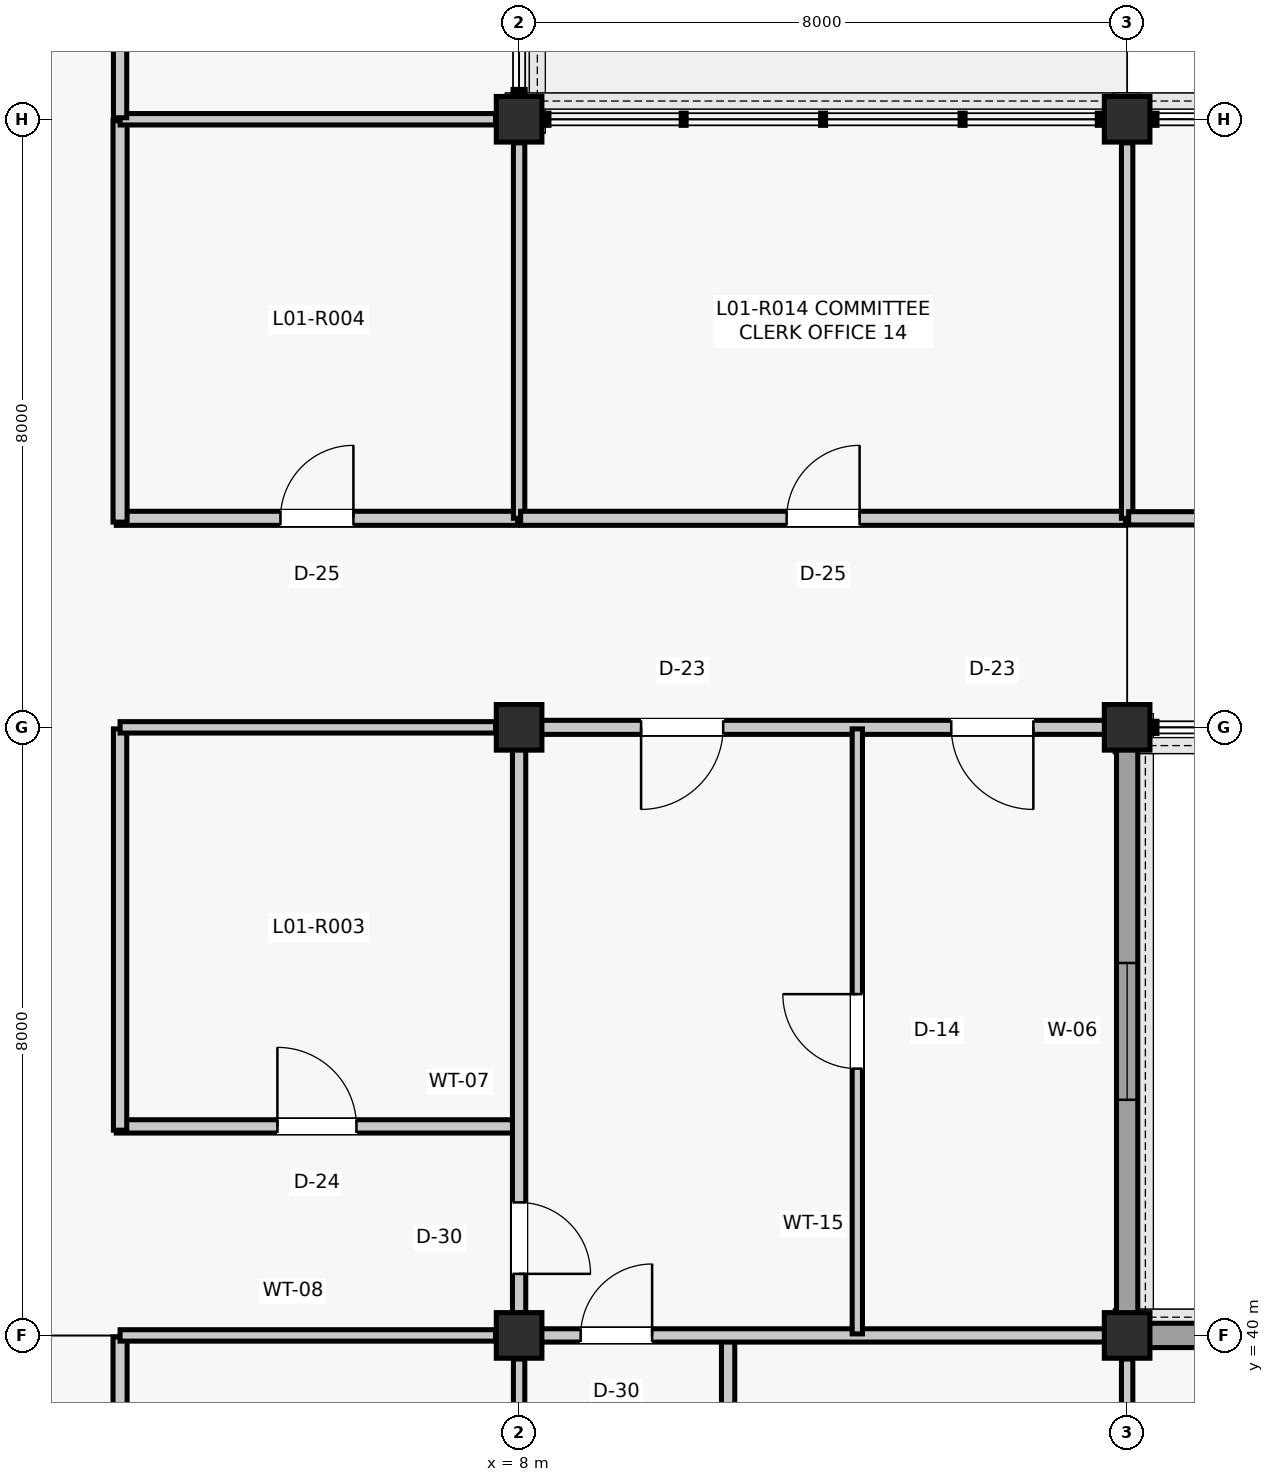
"""IFC4 building model, lengths in metres.
Left out: names, types, materials, properties, quantities, classifications, styles, units other than length and angle.
Written with IfcOpenShell. Run it as: python <this file> out.ifc"""

import sys

from ifc_helpers import new_model, si_unit, direction, frame, frame_2d, origin, origin_2d, place, context, subcontext, project, spatial, rectangle, extrude, element, fill, save


model = new_model("IFC4")
c1 = context("Model", 3, precision=1e-05, world=origin(), true_north=direction((0.0, 1.0)))
c2 = subcontext(c1, "Body", "Model", "MODEL_VIEW")
j1 = project(units=[si_unit("LENGTHUNIT", "METRE"), si_unit("PLANEANGLEUNIT", "RADIAN")], contexts=[c1])
p1 = place(None, origin())
s1 = spatial("IfcSite", under=j1, at=p1, CompositionType="ELEMENT")
p2 = place(p1, origin())
s2 = spatial("IfcBuilding", under=s1, at=p2, CompositionType="ELEMENT")
p3 = place(p2, frame((0.0, 0.0, 5.28)))
s3 = spatial("IfcBuildingStorey", under=s2, at=p3, CompositionType="ELEMENT", Elevation=5.28)
for number, where, z_axis, x_axis in (
    (1, (8.0, 40.0, 0.0), (0.0, 0.0, 1.0), (1.0, 0.0, 0.0)),
    (2, (8.0, 48.0, 0.0), (0.0, 0.0, 1.0), (1.0, 0.0, 0.0)),
    (3, (8.0, 56.0, 0.0), (0.0, 0.0, 1.0), (1.0, 0.0, 0.0)),
    (4, (16.0, 40.0, 0.0), (0.0, 0.0, 1.0), (1.0, 0.0, 0.0)),
    (5, (16.0, 48.0, 0.0), (0.0, 0.0, 1.0), (1.0, 0.0, 0.0)),
    (6, (16.0, 56.0, 0.0), (0.0, 0.0, 1.0), (1.0, 0.0, 0.0)),
):
    element("IfcColumn", number, at=place(p3, frame(where, z_axis=z_axis, x_axis=x_axis)), inside=s3, PredefinedType="COLUMN", context=c2, shape_type="SweptSolid", body=[
        extrude(rectangle(XDim=0.6, YDim=0.6, at=origin_2d()), origin(), (0.0, 0.0, 1.0), 4.62),
    ])
p4 = place(p3, frame((16.0, 40.285, 0.0), z_axis=(0.0, 0.0, 1.0), x_axis=(0.0, 1.0, 0.0)))
e7 = element("IfcWall", 7, at=p4, inside=s3, PredefinedType="SOLIDWALL", context=c2, shape_type="SweptSolid", body=[
    extrude(rectangle(XDim=7.43, YDim=0.28, at=frame_2d((3.715, 0.0))), origin(), (0.0, 0.0, 1.0), 3.91),
])
p5 = place(p4, frame((2.815, 0.0, 0.9)))
e8 = element("IfcOpeningElement", 8, at=p5, cuts=e7, PredefinedType="OPENING", context=c2, shape_type="SweptSolid", body=[
    extrude(rectangle(XDim=1.8, YDim=2.3, at=frame_2d((0.9, 1.15))), frame((0.0, 0.15, 0.0), z_axis=(0.0, -1.0, 0.0), x_axis=(1.0, 0.0, 0.0)), (0.0, 0.0, 1.0), 0.3),
])
p6 = place(p3, frame((16.285, 40.0, 0.0), z_axis=(0.0, 0.0, 1.0), x_axis=(1.0, 0.0, 0.0)))
e9 = element("IfcWall", 9, at=p6, inside=s3, PredefinedType="SOLIDWALL", context=c2, shape_type="SweptSolid", body=[
    extrude(rectangle(XDim=7.43, YDim=0.32, at=frame_2d((3.715, 0.0))), origin(), (0.0, 0.0, 1.0), 3.955),
])
p7 = place(p6, frame((2.815, 0.0, 0.9)))
e10 = element("IfcOpeningElement", 10, at=p7, cuts=e9, PredefinedType="OPENING", context=c2, shape_type="SweptSolid", body=[
    extrude(rectangle(XDim=1.8, YDim=2.3, at=frame_2d((0.9, 1.15))), frame((0.0, 0.17, 0.0), z_axis=(0.0, -1.0, 0.0), x_axis=(1.0, 0.0, 0.0)), (0.0, 0.0, 1.0), 0.34),
])
p8 = place(p3, frame((2.75, 34.7, 0.0), z_axis=(0.0, 0.0, 1.0), x_axis=(0.0, 1.0, 0.0)))
e11 = element("IfcWall", 11, at=p8, inside=s3, PredefinedType="PARTITIONING", context=c2, shape_type="SweptSolid", body=[
    extrude(rectangle(XDim=5.28, YDim=0.185, at=frame_2d((2.64, 0.0))), origin(), (0.0, 0.0, 1.0), 3.787),
])
p9 = place(p3, frame((2.75, 40.0, 0.0), z_axis=(0.0, 0.0, 1.0), x_axis=(1.0, 0.0, 0.0)))
e12 = element("IfcWall", 12, at=p9, inside=s3, PredefinedType="PARTITIONING", context=c2, shape_type="SweptSolid", body=[
    extrude(rectangle(XDim=4.94, YDim=0.15, at=frame_2d((2.47, 0.0))), origin(), (0.0, 0.0, 1.0), 3.787),
])
p10 = place(p3, frame((8.0, 34.75, 0.0), z_axis=(0.0, 0.0, 1.0), x_axis=(0.0, 1.0, 0.0)))
e13 = element("IfcWall", 13, at=p10, inside=s3, PredefinedType="PARTITIONING", context=c2, shape_type="SweptSolid", body=[
    extrude(rectangle(XDim=4.94, YDim=0.15, at=frame_2d((2.47, 0.0))), origin(), (0.0, 0.0, 1.0), 3.857),
])
p11 = place(p3, frame((2.7, 42.75, 0.0), z_axis=(0.0, 0.0, 1.0), x_axis=(1.0, 0.0, 0.0)))
e14 = element("IfcWall", 14, at=p11, inside=s3, PredefinedType="PARTITIONING", context=c2, shape_type="SweptSolid", body=[
    extrude(rectangle(XDim=5.28, YDim=0.175, at=frame_2d((2.64, 0.0))), origin(), (0.0, 0.0, 1.0), 3.781),
])
p12 = place(p11, frame((2.12, 0.0, 0.0)))
e15 = element("IfcOpeningElement", 15, at=p12, cuts=e14, PredefinedType="OPENING", context=c2, shape_type="SweptSolid", body=[
    extrude(rectangle(XDim=1.04, YDim=2.18, at=frame_2d((0.52, 1.09))), frame((0.0, 0.097, 0.0), z_axis=(0.0, -1.0, 0.0), x_axis=(1.0, 0.0, 0.0)), (0.0, 0.0, 1.0), 0.195),
])
p13 = place(p3, frame((2.75, 42.7, 0.0), z_axis=(0.0, 0.0, 1.0), x_axis=(0.0, 1.0, 0.0)))
e16 = element("IfcWall", 16, at=p13, inside=s3, PredefinedType="PARTITIONING", context=c2, shape_type="SweptSolid", body=[
    extrude(rectangle(XDim=5.28, YDim=0.175, at=frame_2d((2.64, 0.0))), origin(), (0.0, 0.0, 1.0), 3.771),
])
p14 = place(p3, frame((2.75, 48.0, 0.0), z_axis=(0.0, 0.0, 1.0), x_axis=(1.0, 0.0, 0.0)))
e17 = element("IfcWall", 17, at=p14, inside=s3, PredefinedType="PARTITIONING", context=c2, shape_type="SweptSolid", body=[
    extrude(rectangle(XDim=4.94, YDim=0.15, at=frame_2d((2.47, 0.0))), origin(), (0.0, 0.0, 1.0), 3.771),
])
p15 = place(p3, frame((2.7, 50.75, 0.0), z_axis=(0.0, 0.0, 1.0), x_axis=(1.0, 0.0, 0.0)))
e18 = element("IfcWall", 18, at=p15, inside=s3, PredefinedType="PARTITIONING", context=c2, shape_type="SweptSolid", body=[
    extrude(rectangle(XDim=5.28, YDim=0.185, at=frame_2d((2.64, 0.0))), origin(), (0.0, 0.0, 1.0), 3.851),
])
p16 = place(p15, frame((2.16, 0.0, 0.0)))
e19 = element("IfcOpeningElement", 19, at=p16, cuts=e18, PredefinedType="OPENING", context=c2, shape_type="SweptSolid", body=[
    extrude(rectangle(XDim=0.96, YDim=2.14, at=frame_2d((0.48, 1.07))), frame((0.0, 0.103, 0.0), z_axis=(0.0, -1.0, 0.0), x_axis=(1.0, 0.0, 0.0)), (0.0, 0.0, 1.0), 0.205),
])
p17 = place(p3, frame((2.75, 50.7, 0.0), z_axis=(0.0, 0.0, 1.0), x_axis=(0.0, 1.0, 0.0)))
e20 = element("IfcWall", 20, at=p17, inside=s3, PredefinedType="PARTITIONING", context=c2, shape_type="SweptSolid", body=[
    extrude(rectangle(XDim=5.28, YDim=0.185, at=frame_2d((2.64, 0.0))), origin(), (0.0, 0.0, 1.0), 3.781),
])
p18 = place(p3, frame((2.75, 56.0, 0.0), z_axis=(0.0, 0.0, 1.0), x_axis=(1.0, 0.0, 0.0)))
e21 = element("IfcWall", 21, at=p18, inside=s3, PredefinedType="PARTITIONING", context=c2, shape_type="SweptSolid", body=[
    extrude(rectangle(XDim=4.94, YDim=0.15, at=frame_2d((2.47, 0.0))), origin(), (0.0, 0.0, 1.0), 3.781),
])
p19 = place(p3, frame((8.0, 50.75, 0.0), z_axis=(0.0, 0.0, 1.0), x_axis=(0.0, 1.0, 0.0)))
e22 = element("IfcWall", 22, at=p19, inside=s3, PredefinedType="PARTITIONING", context=c2, shape_type="SweptSolid", body=[
    extrude(rectangle(XDim=4.94, YDim=0.15, at=frame_2d((2.47, 0.0))), origin(), (0.0, 0.0, 1.0), 3.851),
])
p20 = place(p3, frame((2.75, 56.02, 0.0), z_axis=(0.0, 0.0, 1.0), x_axis=(0.0, 1.0, 0.0)))
e23 = element("IfcWall", 23, at=p20, inside=s3, PredefinedType="PARTITIONING", context=c2, shape_type="SweptSolid", body=[
    extrude(rectangle(XDim=7.96, YDim=0.175, at=frame_2d((3.98, 0.0))), origin(), (0.0, 0.0, 1.0), 3.712),
])
p21 = place(p20, frame((3.42, 0.0, 0.0)))
e24 = element("IfcOpeningElement", 24, at=p21, cuts=e23, PredefinedType="OPENING", context=c2, shape_type="SweptSolid", body=[
    extrude(rectangle(XDim=1.12, YDim=2.22, at=frame_2d((0.56, 1.11))), frame((0.0, 0.097, 0.0), z_axis=(0.0, -1.0, 0.0), x_axis=(1.0, 0.0, 0.0)), (0.0, 0.0, 1.0), 0.195),
])
p22 = place(p3, frame((10.75, 34.7, 0.0), z_axis=(0.0, 0.0, 1.0), x_axis=(0.0, 1.0, 0.0)))
e25 = element("IfcWall", 25, at=p22, inside=s3, PredefinedType="PARTITIONING", context=c2, shape_type="SweptSolid", body=[
    extrude(rectangle(XDim=5.28, YDim=0.175, at=frame_2d((2.64, 0.0))), origin(), (0.0, 0.0, 1.0), 3.771),
])
p23 = place(p3, frame((16.0, 34.75, 0.0), z_axis=(0.0, 0.0, 1.0), x_axis=(0.0, 1.0, 0.0)))
e26 = element("IfcWall", 26, at=p23, inside=s3, PredefinedType="PARTITIONING", context=c2, shape_type="SweptSolid", body=[
    extrude(rectangle(XDim=4.94, YDim=0.15, at=frame_2d((2.47, 0.0))), origin(), (0.0, 0.0, 1.0), 3.781),
])
p24 = place(p3, frame((8.02, 50.75, 0.0), z_axis=(0.0, 0.0, 1.0), x_axis=(1.0, 0.0, 0.0)))
e27 = element("IfcWall", 27, at=p24, inside=s3, PredefinedType="PARTITIONING", context=c2, shape_type="SweptSolid", body=[
    extrude(rectangle(XDim=7.96, YDim=0.185, at=frame_2d((3.98, 0.0))), origin(), (0.0, 0.0, 1.0), 3.787),
])
p25 = place(p24, frame((3.5, 0.0, 0.0)))
e28 = element("IfcOpeningElement", 28, at=p25, cuts=e27, PredefinedType="OPENING", context=c2, shape_type="SweptSolid", body=[
    extrude(rectangle(XDim=0.96, YDim=2.14, at=frame_2d((0.48, 1.07))), frame((0.0, 0.103, 0.0), z_axis=(0.0, -1.0, 0.0), x_axis=(1.0, 0.0, 0.0)), (0.0, 0.0, 1.0), 0.205),
])
p26 = place(p3, frame((16.0, 50.75, 0.0), z_axis=(0.0, 0.0, 1.0), x_axis=(0.0, 1.0, 0.0)))
e29 = element("IfcWall", 29, at=p26, inside=s3, PredefinedType="PARTITIONING", context=c2, shape_type="SweptSolid", body=[
    extrude(rectangle(XDim=4.94, YDim=0.15, at=frame_2d((2.47, 0.0))), origin(), (0.0, 0.0, 1.0), 3.787),
])
p27 = place(p3, frame((16.02, 50.75, 0.0), z_axis=(0.0, 0.0, 1.0), x_axis=(1.0, 0.0, 0.0)))
e30 = element("IfcWall", 30, at=p27, inside=s3, PredefinedType="PARTITIONING", context=c2, shape_type="SweptSolid", body=[
    extrude(rectangle(XDim=7.96, YDim=0.175, at=frame_2d((3.98, 0.0))), origin(), (0.0, 0.0, 1.0), 3.787),
])
p28 = place(p27, frame((3.51, 0.0, 0.0)))
e31 = element("IfcOpeningElement", 31, at=p28, cuts=e30, PredefinedType="OPENING", context=c2, shape_type="SweptSolid", body=[
    extrude(rectangle(XDim=0.94, YDim=2.12, at=frame_2d((0.47, 1.06))), frame((0.0, 0.097, 0.0), z_axis=(0.0, -1.0, 0.0), x_axis=(1.0, 0.0, 0.0)), (0.0, 0.0, 1.0), 0.195),
])
p29 = place(p3, frame((8.0, 40.29, 0.0), z_axis=(0.0, 0.0, 1.0), x_axis=(0.0, 1.0, 0.0)))
e32 = element("IfcWall", 32, at=p29, inside=s3, PredefinedType="PARTITIONING", context=c2, shape_type="SweptSolid", body=[
    extrude(rectangle(XDim=7.42, YDim=0.175, at=frame_2d((3.71, 0.0))), origin(), (0.0, 0.0, 1.0), 3.781),
])
p30 = place(p29, frame((0.52, 0.0, 0.0)))
e33 = element("IfcOpeningElement", 33, at=p30, cuts=e32, PredefinedType="OPENING", context=c2, shape_type="SweptSolid", body=[
    extrude(rectangle(XDim=0.94, YDim=2.12, at=frame_2d((0.47, 1.06))), frame((0.0, 0.097, 0.0), z_axis=(0.0, -1.0, 0.0), x_axis=(1.0, 0.0, 0.0)), (0.0, 0.0, 1.0), 0.195),
])
p31 = place(p3, frame((8.29, 40.0, 0.0), z_axis=(0.0, 0.0, 1.0), x_axis=(1.0, 0.0, 0.0)))
e34 = element("IfcWall", 34, at=p31, inside=s3, PredefinedType="PARTITIONING", context=c2, shape_type="SweptSolid", body=[
    extrude(rectangle(XDim=7.42, YDim=0.175, at=frame_2d((3.71, 0.0))), origin(), (0.0, 0.0, 1.0), 3.771),
])
p32 = place(p31, frame((0.52, 0.0, 0.0)))
e35 = element("IfcOpeningElement", 35, at=p32, cuts=e34, PredefinedType="OPENING", context=c2, shape_type="SweptSolid", body=[
    extrude(rectangle(XDim=0.94, YDim=2.12, at=frame_2d((0.47, 1.06))), frame((0.0, 0.097, 0.0), z_axis=(0.0, -1.0, 0.0), x_axis=(1.0, 0.0, 0.0)), (0.0, 0.0, 1.0), 0.195),
])
p33 = place(p3, frame((8.29, 48.0, 0.0), z_axis=(0.0, 0.0, 1.0), x_axis=(1.0, 0.0, 0.0)))
e36 = element("IfcWall", 36, at=p33, inside=s3, PredefinedType="PARTITIONING", context=c2, shape_type="SweptSolid", body=[
    extrude(rectangle(XDim=7.42, YDim=0.185, at=frame_2d((3.71, 0.0))), origin(), (0.0, 0.0, 1.0), 3.781),
])
p34 = place(p33, frame((1.315, 0.0, 0.0)))
e37 = element("IfcOpeningElement", 37, at=p34, cuts=e36, PredefinedType="OPENING", context=c2, shape_type="SweptSolid", body=[
    extrude(rectangle(XDim=1.08, YDim=2.2, at=frame_2d((0.54, 1.1))), frame((0.0, 0.103, 0.0), z_axis=(0.0, -1.0, 0.0), x_axis=(1.0, 0.0, 0.0)), (0.0, 0.0, 1.0), 0.205),
])
p35 = place(p33, frame((5.396, 0.0, 0.0)))
e38 = element("IfcOpeningElement", 38, at=p35, cuts=e36, PredefinedType="OPENING", context=c2, shape_type="SweptSolid", body=[
    extrude(rectangle(XDim=1.08, YDim=2.2, at=frame_2d((0.54, 1.1))), frame((0.0, 0.103, 0.0), z_axis=(0.0, -1.0, 0.0), x_axis=(1.0, 0.0, 0.0)), (0.0, 0.0, 1.0), 0.205),
])
p36 = place(p3, frame((12.45, 40.02, 0.0), z_axis=(0.0, 0.0, 1.0), x_axis=(0.0, 1.0, 0.0)))
e39 = element("IfcWall", 39, at=p36, inside=s3, PredefinedType="PARTITIONING", context=c2, shape_type="SweptSolid", body=[
    extrude(rectangle(XDim=7.96, YDim=0.135, at=frame_2d((3.98, 0.0))), origin(), (0.0, 0.0, 1.0), 3.771),
])
p37 = place(p36, frame((3.49, 0.0, 0.0)))
e40 = element("IfcOpeningElement", 40, at=p37, cuts=e39, PredefinedType="OPENING", context=c2, shape_type="SweptSolid", body=[
    extrude(rectangle(XDim=0.98, YDim=2.15, at=frame_2d((0.49, 1.075))), frame((0.0, 0.077, 0.0), z_axis=(0.0, -1.0, 0.0), x_axis=(1.0, 0.0, 0.0)), (0.0, 0.0, 1.0), 0.155),
])
p38 = place(p5, origin())
e41 = element("IfcWindow", 41, at=p38, inside=s3, PartitioningType="SINGLE_PANEL", PredefinedType="WINDOW", context=c2, shape_type="SweptSolid", body=[
    extrude(rectangle(XDim=1.8, YDim=2.3, at=frame_2d((0.9, 1.15))), frame((0.0, 0.03, 0.0), z_axis=(0.0, -1.0, 0.0), x_axis=(1.0, 0.0, 0.0)), (0.0, 0.0, 1.0), 0.06),
])
fill(e8, e41)
p39 = place(p12, origin())
e42 = element("IfcDoor", 42, at=p39, inside=s3, OperationType="SINGLE_SWING_LEFT", PredefinedType="DOOR", context=c2, shape_type="SweptSolid", body=[
    extrude(rectangle(XDim=1.04, YDim=2.18, at=frame_2d((0.52, 1.09))), frame((0.0, 0.025, 0.0), z_axis=(0.0, -1.0, 0.0), x_axis=(1.0, 0.0, 0.0)), (0.0, 0.0, 1.0), 0.05),
])
fill(e15, e42)
p40 = place(p16, origin())
e43 = element("IfcDoor", 43, at=p40, inside=s3, OperationType="SINGLE_SWING_RIGHT", PredefinedType="DOOR", context=c2, shape_type="SweptSolid", body=[
    extrude(rectangle(XDim=0.96, YDim=2.14, at=frame_2d((0.48, 1.07))), frame((0.0, 0.025, 0.0), z_axis=(0.0, -1.0, 0.0), x_axis=(1.0, 0.0, 0.0)), (0.0, 0.0, 1.0), 0.05),
])
fill(e19, e43)
p41 = place(p25, origin())
e44 = element("IfcDoor", 44, at=p41, inside=s3, OperationType="SINGLE_SWING_RIGHT", PredefinedType="DOOR", context=c2, shape_type="SweptSolid", body=[
    extrude(rectangle(XDim=0.96, YDim=2.14, at=frame_2d((0.48, 1.07))), frame((0.0, 0.025, 0.0), z_axis=(0.0, -1.0, 0.0), x_axis=(1.0, 0.0, 0.0)), (0.0, 0.0, 1.0), 0.05),
])
fill(e28, e44)
p42 = place(p30, frame((0.94, 0.0, 0.0), z_axis=(0.0, 0.0, 1.0), x_axis=(-1.0, 0.0, 0.0)))
e45 = element("IfcDoor", 45, at=p42, inside=s3, OperationType="SINGLE_SWING_LEFT", PredefinedType="DOOR", context=c2, shape_type="SweptSolid", body=[
    extrude(rectangle(XDim=0.94, YDim=2.12, at=frame_2d((0.47, 1.06))), frame((0.0, 0.025, 0.0), z_axis=(0.0, -1.0, 0.0), x_axis=(1.0, 0.0, 0.0)), (0.0, 0.0, 1.0), 0.05),
])
fill(e33, e45)
p43 = place(p32, origin())
e46 = element("IfcDoor", 46, at=p43, inside=s3, OperationType="SINGLE_SWING_RIGHT", PredefinedType="DOOR", context=c2, shape_type="SweptSolid", body=[
    extrude(rectangle(XDim=0.94, YDim=2.12, at=frame_2d((0.47, 1.06))), frame((0.0, 0.025, 0.0), z_axis=(0.0, -1.0, 0.0), x_axis=(1.0, 0.0, 0.0)), (0.0, 0.0, 1.0), 0.05),
])
fill(e35, e46)
p44 = place(p34, frame((1.08, 0.0, 0.0), z_axis=(0.0, 0.0, 1.0), x_axis=(-1.0, 0.0, 0.0)))
e47 = element("IfcDoor", 47, at=p44, inside=s3, OperationType="SINGLE_SWING_LEFT", PredefinedType="DOOR", context=c2, shape_type="SweptSolid", body=[
    extrude(rectangle(XDim=1.08, YDim=2.2, at=frame_2d((0.54, 1.1))), frame((0.0, 0.025, 0.0), z_axis=(0.0, -1.0, 0.0), x_axis=(1.0, 0.0, 0.0)), (0.0, 0.0, 1.0), 0.05),
])
fill(e37, e47)
p45 = place(p35, frame((1.08, 0.0, 0.0), z_axis=(0.0, 0.0, 1.0), x_axis=(-1.0, 0.0, 0.0)))
e48 = element("IfcDoor", 48, at=p45, inside=s3, OperationType="SINGLE_SWING_RIGHT", PredefinedType="DOOR", context=c2, shape_type="SweptSolid", body=[
    extrude(rectangle(XDim=1.08, YDim=2.2, at=frame_2d((0.54, 1.1))), frame((0.0, 0.025, 0.0), z_axis=(0.0, -1.0, 0.0), x_axis=(1.0, 0.0, 0.0)), (0.0, 0.0, 1.0), 0.05),
])
fill(e38, e48)
p46 = place(p37, origin())
e49 = element("IfcDoor", 49, at=p46, inside=s3, OperationType="SINGLE_SWING_RIGHT", PredefinedType="DOOR", context=c2, shape_type="SweptSolid", body=[
    extrude(rectangle(XDim=0.98, YDim=2.15, at=frame_2d((0.49, 1.075))), frame((0.0, 0.025, 0.0), z_axis=(0.0, -1.0, 0.0), x_axis=(1.0, 0.0, 0.0)), (0.0, 0.0, 1.0), 0.05),
])
fill(e40, e49)
save(model, sys.argv[1])
